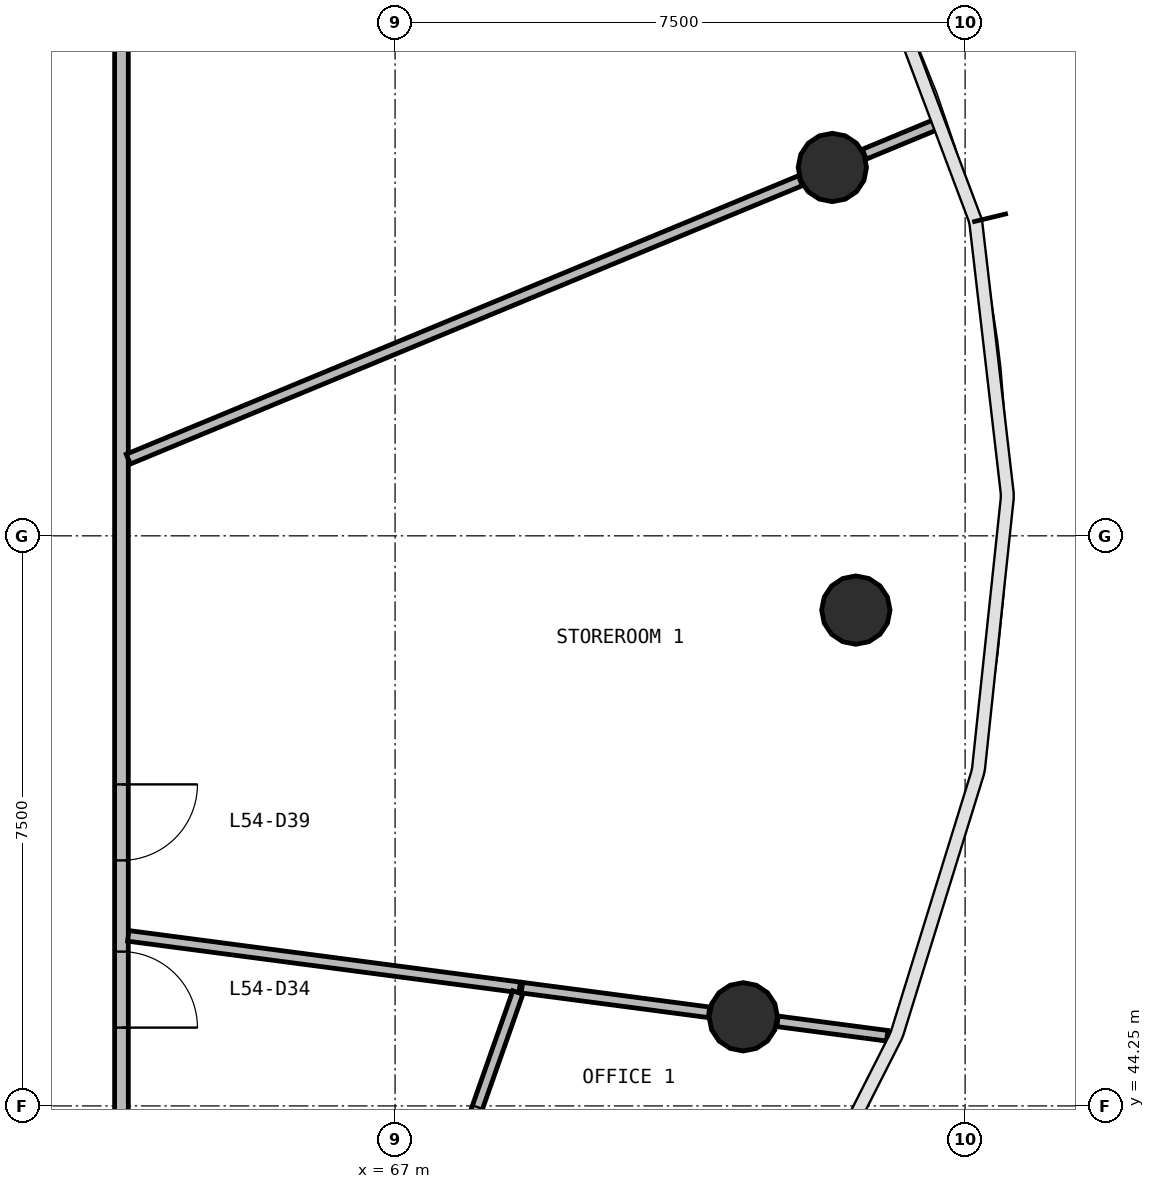
"""IFC4 building model, lengths in metres.
Left out: names, types, materials, properties, quantities, classifications, styles, units other than length and angle.
Written with IfcOpenShell. Run it as: python <this file> out.ifc"""

import sys

from ifc_helpers import new_model, si_unit, direction, frame, frame_2d, origin, origin_2d, place, context, subcontext, project, spatial, rectangle, circle, extrude, source, transform, mapped, element, fill, save


model = new_model("IFC4")
c1 = context("Model", 3, precision=1e-05, world=origin(), true_north=direction((0.0, 1.0)))
c2 = subcontext(c1, "Body", "Model", "MODEL_VIEW")
j1 = project(units=[si_unit("LENGTHUNIT", "METRE"), si_unit("PLANEANGLEUNIT", "RADIAN")], contexts=[c1])
p1 = place(None, origin())
s1 = spatial("IfcSite", under=j1, at=p1, CompositionType="ELEMENT")
p2 = place(p1, origin())
s2 = spatial("IfcBuilding", under=s1, at=p2, CompositionType="ELEMENT")
p3 = place(p2, frame((0.0, 0.0, 222.8)))
s3 = spatial("IfcBuildingStorey", under=s2, at=p3, CompositionType="ELEMENT", Elevation=222.8)
m1 = source(origin(), c2, "Body", "SweptSolid", [
    extrude(circle(Radius=0.45, at=origin_2d()), origin(), (0.0, 0.0, 1.0), 3.9),
])
for number, where, z_axis, x_axis in (
    (1, (73.062, 50.773, 0.0), (0.0, 0.0, 1.0), (1.0, 0.0, 0.0)),
    (2, (72.753, 56.596, 0.0), (0.0, 0.0, 1.0), (1.0, 0.0, 0.0)),
    (3, (71.581, 45.422, 0.0), (0.0, 0.0, 1.0), (1.0, 0.0, 0.0)),
):
    element("IfcColumn", number, at=place(p3, frame(where, z_axis=z_axis, x_axis=x_axis)), inside=s3, PredefinedType="COLUMN", context=c2, shape_type="MappedRepresentation", body=[
        mapped(m1, transform((0.0, 0.0, 0.0), scale=1.0)),
    ])
p4 = place(p3, frame((63.4, 58.37, 0.0), z_axis=(0.0, 0.0, 1.0), x_axis=(0.0, -1.0, 0.0)))
e4 = element("IfcWall", 4, at=p4, inside=s3, PredefinedType="PARTITIONING", context=c2, shape_type="SweptSolid", body=[
    extrude(rectangle(XDim=20.74, YDim=0.18, at=frame_2d((10.37, 0.0))), origin(), (0.0, 0.0, 1.0), 2.88),
])
p5 = place(p4, frame((12.09, 0.0, 0.0)))
e5 = element("IfcOpeningElement", 5, at=p5, cuts=e4, PredefinedType="OPENING", context=c2, shape_type="SweptSolid", body=[
    extrude(rectangle(XDim=1.0, YDim=2.1, at=frame_2d((0.5, 1.05))), frame((0.0, 0.1, 0.0), z_axis=(0.0, -1.0, 0.0), x_axis=(1.0, 0.0, 0.0)), (0.0, 0.0, 1.0), 0.2),
])
p6 = place(p4, frame((9.89, 0.0, 0.0)))
e6 = element("IfcOpeningElement", 6, at=p6, cuts=e4, PredefinedType="OPENING", context=c2, shape_type="SweptSolid", body=[
    extrude(rectangle(XDim=1.0, YDim=2.1, at=frame_2d((0.5, 1.05))), frame((0.0, 0.1, 0.0), z_axis=(0.0, -1.0, 0.0), x_axis=(1.0, 0.0, 0.0)), (0.0, 0.0, 1.0), 0.2),
])
p7 = place(p3, frame((63.49, 52.759, 0.0), z_axis=(0.0, 0.0, 1.0), x_axis=(0.923877866197, 0.382687455178, 0.0)))
e7 = element("IfcWall", 7, at=p7, inside=s3, PredefinedType="PARTITIONING", context=c2, shape_type="SweptSolid", body=[
    extrude(rectangle(XDim=9.571, YDim=0.14, at=frame_2d((4.786, 0.0))), origin(), (0.0, 0.0, 1.0), 2.88),
])
p8 = place(p3, frame((63.49, 46.487, 0.0), z_axis=(0.0, 0.0, 1.0), x_axis=(0.991443732817, -0.130534764177, 0.0)))
e8 = element("IfcWall", 8, at=p8, inside=s3, PredefinedType="PARTITIONING", context=c2, shape_type="SweptSolid", body=[
    extrude(rectangle(XDim=5.194, YDim=0.14, at=frame_2d((2.597, 0.0))), origin(), (0.0, 0.0, 1.0), 2.88),
])
p9 = place(p3, frame((68.615, 45.742, 0.0), z_axis=(0.0, 0.0, 1.0), x_axis=(-0.331975337051, -0.94328806607, 0.0)))
e9 = element("IfcWall", 9, at=p9, inside=s3, PredefinedType="PARTITIONING", context=c2, shape_type="SweptSolid", body=[
    extrude(rectangle(XDim=4.249, YDim=0.14, at=frame_2d((2.124, 0.0))), origin(), (0.0, 0.0, 1.0), 2.88),
])
p10 = place(p9, frame((1.599, 0.0, 0.0)))
e10 = element("IfcOpeningElement", 10, at=p10, cuts=e9, PredefinedType="OPENING", context=c2, shape_type="SweptSolid", body=[
    extrude(rectangle(XDim=1.0, YDim=2.1, at=frame_2d((0.5, 1.05))), frame((0.0, 0.08, 0.0), z_axis=(0.0, -1.0, 0.0), x_axis=(1.0, 0.0, 0.0)), (0.0, 0.0, 1.0), 0.16),
])
p11 = place(p3, frame((68.669, 45.805, 0.0), z_axis=(0.0, 0.0, 1.0), x_axis=(0.991448939308, -0.130495213495, 0.0)))
e11 = element("IfcWall", 11, at=p11, inside=s3, PredefinedType="PARTITIONING", context=c2, shape_type="SweptSolid", body=[
    extrude(rectangle(XDim=2.483, YDim=0.14, at=frame_2d((1.241, 0.0))), origin(), (0.0, 0.0, 1.0), 2.88),
])
p12 = place(p3, frame((72.031, 45.363, 0.0), z_axis=(0.0, 0.0, 1.0), x_axis=(0.991438884998, -0.130571579275, 0.0)))
e12 = element("IfcWall", 12, at=p12, inside=s3, PredefinedType="PARTITIONING", context=c2, shape_type="SweptSolid", body=[
    extrude(rectangle(XDim=1.457, YDim=0.14, at=frame_2d((0.728, 0.0))), origin(), (0.0, 0.0, 1.0), 2.88),
])
p13 = place(p3, frame((73.174, 56.77, 0.0), z_axis=(0.0, 0.0, 1.0), x_axis=(0.92384548676, 0.382765615741, 0.0)))
e13 = element("IfcWall", 13, at=p13, inside=s3, PredefinedType="PARTITIONING", context=c2, shape_type="SweptSolid", body=[
    extrude(rectangle(XDim=1.059, YDim=0.14, at=frame_2d((0.53, 0.0))), origin(), (0.0, 0.0, 1.0), 2.88),
])
m2 = source(origin(), c2, "Body", "SweptSolid", [
    extrude(rectangle(XDim=1.0, YDim=2.1, at=frame_2d((0.5, 1.05))), frame((0.0, 0.025, 0.0), z_axis=(0.0, -1.0, 0.0), x_axis=(1.0, 0.0, 0.0)), (0.0, 0.0, 1.0), 0.05),
])
p14 = place(p5, origin())
e14 = element("IfcDoor", 14, at=p14, inside=s3, OperationType="SINGLE_SWING_RIGHT", PredefinedType="DOOR", context=c2, shape_type="MappedRepresentation", body=[
    mapped(m2, transform((0.0, 0.0, 0.0), scale=1.0)),
])
fill(e5, e14)
p15 = place(p10, origin())
e15 = element("IfcDoor", 15, at=p15, inside=s3, OperationType="SINGLE_SWING_RIGHT", PredefinedType="DOOR", context=c2, shape_type="MappedRepresentation", body=[
    mapped(m2, transform((0.0, 0.0, 0.0), scale=1.0)),
])
fill(e10, e15)
p16 = place(p6, origin())
e16 = element("IfcDoor", 16, at=p16, inside=s3, OperationType="SINGLE_SWING_LEFT", PredefinedType="DOOR", context=c2, shape_type="MappedRepresentation", body=[
    mapped(m2, transform((0.0, 0.0, 0.0), scale=1.0)),
])
fill(e6, e16)
save(model, sys.argv[1])
